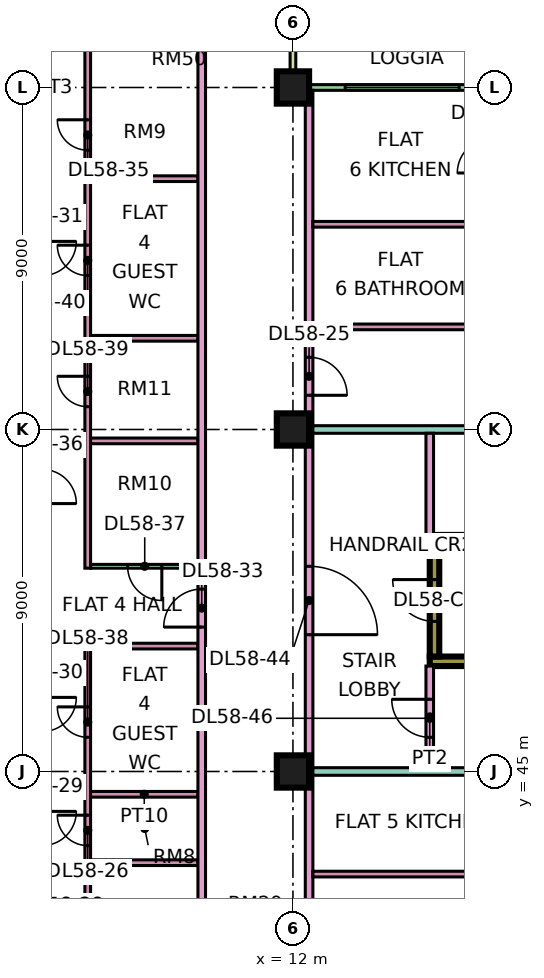
"""IFC4 building model, lengths in metres.
Left out: names, types, materials, properties, quantities, classifications, styles, units other than length and angle.
Written with IfcOpenShell. Run it as: python <this file> out.ifc"""

import sys

from ifc_helpers import new_model, si_unit, direction, frame, frame_2d, origin, origin_2d, place, context, subcontext, project, spatial, rectangle, extrude, element, fill, save


model = new_model("IFC4")
c1 = context("Model", 3, precision=1e-05, world=origin(), true_north=direction((0.0, 1.0)))
c2 = subcontext(c1, "Body", "Model", "MODEL_VIEW")
j1 = project(units=[si_unit("LENGTHUNIT", "METRE"), si_unit("PLANEANGLEUNIT", "RADIAN")], contexts=[c1])
p1 = place(None, origin())
s1 = spatial("IfcSite", under=j1, at=p1, CompositionType="ELEMENT")
p2 = place(p1, origin())
s2 = spatial("IfcBuilding", under=s1, at=p2, CompositionType="ELEMENT")
p3 = place(p2, frame((0.0, 0.0, 245.4)))
s3 = spatial("IfcBuildingStorey", under=s2, at=p3, CompositionType="ELEMENT", Elevation=245.4)
for number, where, z_axis, x_axis in (
    (1, (12.0, 45.0, 0.0), (0.0, 0.0, 1.0), (1.0, 0.0, 0.0)),
    (2, (12.0, 54.0, 0.0), (0.0, 0.0, 1.0), (1.0, 0.0, 0.0)),
    (3, (12.0, 63.0, 0.0), (0.0, 0.0, 1.0), (1.0, 0.0, 0.0)),
):
    element("IfcColumn", number, at=place(p3, frame(where, z_axis=z_axis, x_axis=x_axis)), inside=s3, PredefinedType="COLUMN", context=c2, shape_type="SweptSolid", body=[
        extrude(rectangle(XDim=0.85, YDim=0.85, at=origin_2d()), origin(), (0.0, 0.0, 1.0), 3.75),
    ])
for number, where, z_axis, x_axis in (
    (4, (15.6, 47.9, 0.0), (0.0, 0.0, 1.0), (1.0, 0.0, 0.0)),
    (5, (15.6, 51.1, 0.0), (0.0, 0.0, 1.0), (1.0, 0.0, 0.0)),
):
    element("IfcWall", number, at=place(p3, frame(where, z_axis=z_axis, x_axis=x_axis)), inside=s3, PredefinedType="SHEAR", context=c2, shape_type="SweptSolid", body=[
        extrude(rectangle(XDim=7.0, YDim=0.25, at=frame_2d((3.5, 0.0))), origin(), (0.0, 0.0, 1.0), 3.75),
    ])
p4 = place(p3, frame((15.725, 48.025, 0.0), z_axis=(0.0, 0.0, 1.0), x_axis=(0.0, 1.0, 0.0)))
e6 = element("IfcWall", 6, at=p4, inside=s3, PredefinedType="SHEAR", context=c2, shape_type="SweptSolid", body=[
    extrude(rectangle(XDim=2.95, YDim=0.25, at=frame_2d((1.475, 0.0))), origin(), (0.0, 0.0, 1.0), 3.75),
])
p5 = place(p4, frame((0.925, 0.0, 0.0)))
e7 = element("IfcOpeningElement", 7, at=p5, cuts=e6, PredefinedType="OPENING", context=c2, shape_type="SweptSolid", body=[
    extrude(rectangle(XDim=1.1, YDim=2.2, at=frame_2d((0.55, 1.1))), frame((0.0, 0.135, 0.0), z_axis=(0.0, -1.0, 0.0), x_axis=(1.0, 0.0, 0.0)), (0.0, 0.0, 1.0), 0.27),
])
p6 = place(p3, frame((22.425, 63.0, 0.0), z_axis=(0.0, 0.0, 1.0), x_axis=(-1.0, 0.0, 0.0)))
e8 = element("IfcWall", 8, at=p6, inside=s3, PredefinedType="SOLIDWALL", context=c2, shape_type="SweptSolid", body=[
    extrude(rectangle(XDim=10.35, YDim=0.15, at=frame_2d((5.175, 0.0))), origin(), (0.0, 0.0, 1.0), 3.35),
])
p7 = place(p6, frame((1.7, 0.0, 0.0)))
e9 = element("IfcOpeningElement", 9, at=p7, cuts=e8, PredefinedType="OPENING", context=c2, shape_type="SweptSolid", body=[
    extrude(rectangle(XDim=1.8, YDim=2.4, at=frame_2d((0.9, 1.2))), frame((0.0, 0.085, 0.0), z_axis=(0.0, -1.0, 0.0), x_axis=(1.0, 0.0, 0.0)), (0.0, 0.0, 1.0), 0.17),
])
p8 = place(p6, frame((6.05, 0.0, 0.45)))
e10 = element("IfcOpeningElement", 10, at=p8, cuts=e8, PredefinedType="OPENING", context=c2, shape_type="SweptSolid", body=[
    extrude(rectangle(XDim=3.0, YDim=2.4, at=frame_2d((1.5, 1.2))), frame((0.0, 0.085, 0.0), z_axis=(0.0, -1.0, 0.0), x_axis=(1.0, 0.0, 0.0)), (0.0, 0.0, 1.0), 0.17),
])
p9 = place(p3, frame((12.0, 64.5, 0.0), z_axis=(0.0, 0.0, 1.0), x_axis=(0.0, -1.0, 0.0)))
e11 = element("IfcWall", 11, at=p9, inside=s3, PredefinedType="SOLIDWALL", context=c2, shape_type="SweptSolid", body=[
    extrude(rectangle(XDim=1.5, YDim=0.15, at=frame_2d((0.75, 0.0))), origin(), (0.0, 0.0, 1.0), 3.35),
])
p10 = place(p3, frame((5.45, 63.0, 0.0), z_axis=(0.0, 0.0, 1.0), x_axis=(1.0, 0.0, 0.0)))
e12 = element("IfcWall", 12, at=p10, inside=s3, PredefinedType="PARTITIONING", context=c2, shape_type="SweptSolid", body=[
    extrude(rectangle(XDim=0.55, YDim=0.1, at=frame_2d((0.275, 0.0))), origin(), (0.0, 0.0, 1.0), 3.35),
])
p11 = place(p3, frame((6.6, 36.1, 0.0), z_axis=(0.0, 0.0, 1.0), x_axis=(0.0, 1.0, 0.0)))
e13 = element("IfcWall", 13, at=p11, inside=s3, PredefinedType="PARTITIONING", context=c2, shape_type="SweptSolid", body=[
    extrude(rectangle(XDim=12.275, YDim=0.15, at=frame_2d((6.137, 0.0))), origin(), (0.0, 0.0, 1.0), 3.35),
])
p12 = place(p11, frame((6.95, 0.0, 0.0)))
e14 = element("IfcOpeningElement", 14, at=p12, cuts=e13, PredefinedType="OPENING", context=c2, shape_type="SweptSolid", body=[
    extrude(rectangle(XDim=0.8, YDim=2.1, at=frame_2d((0.4, 1.05))), frame((0.0, 0.085, 0.0), z_axis=(0.0, -1.0, 0.0), x_axis=(1.0, 0.0, 0.0)), (0.0, 0.0, 1.0), 0.17),
])
p13 = place(p11, frame((2.75, 0.0, 0.0)))
e15 = element("IfcOpeningElement", 15, at=p13, cuts=e13, PredefinedType="OPENING", context=c2, shape_type="SweptSolid", body=[
    extrude(rectangle(XDim=0.9, YDim=2.1, at=frame_2d((0.45, 1.05))), frame((0.0, 0.085, 0.0), z_axis=(0.0, -1.0, 0.0), x_axis=(1.0, 0.0, 0.0)), (0.0, 0.0, 1.0), 0.17),
])
p14 = place(p11, frame((9.8, 0.0, 0.0)))
e16 = element("IfcOpeningElement", 16, at=p14, cuts=e13, PredefinedType="OPENING", context=c2, shape_type="SweptSolid", body=[
    extrude(rectangle(XDim=0.8, YDim=2.1, at=frame_2d((0.4, 1.05))), frame((0.0, 0.085, 0.0), z_axis=(0.0, -1.0, 0.0), x_axis=(1.0, 0.0, 0.0)), (0.0, 0.0, 1.0), 0.17),
])
p15 = place(p3, frame((6.6, 50.35, 0.0), z_axis=(0.0, 0.0, 1.0), x_axis=(0.0, 1.0, 0.0)))
e17 = element("IfcWall", 17, at=p15, inside=s3, PredefinedType="PARTITIONING", context=c2, shape_type="SweptSolid", body=[
    extrude(rectangle(XDim=14.0, YDim=0.15, at=frame_2d((7.0, 0.0))), origin(), (0.0, 0.0, 1.0), 3.35),
])
p16 = place(p15, frame((11.0, 0.0, 0.0)))
e18 = element("IfcOpeningElement", 18, at=p16, cuts=e17, PredefinedType="OPENING", context=c2, shape_type="SweptSolid", body=[
    extrude(rectangle(XDim=0.8, YDim=2.1, at=frame_2d((0.4, 1.05))), frame((0.0, 0.085, 0.0), z_axis=(0.0, -1.0, 0.0), x_axis=(1.0, 0.0, 0.0)), (0.0, 0.0, 1.0), 0.17),
])
p17 = place(p15, frame((4.25, 0.0, 0.0)))
e19 = element("IfcOpeningElement", 19, at=p17, cuts=e17, PredefinedType="OPENING", context=c2, shape_type="SweptSolid", body=[
    extrude(rectangle(XDim=0.8, YDim=2.1, at=frame_2d((0.4, 1.05))), frame((0.0, 0.085, 0.0), z_axis=(0.0, -1.0, 0.0), x_axis=(1.0, 0.0, 0.0)), (0.0, 0.0, 1.0), 0.17),
])
p18 = place(p15, frame((7.7, 0.0, 0.0)))
e20 = element("IfcOpeningElement", 20, at=p18, cuts=e17, PredefinedType="OPENING", context=c2, shape_type="SweptSolid", body=[
    extrude(rectangle(XDim=0.8, YDim=2.1, at=frame_2d((0.4, 1.05))), frame((0.0, 0.085, 0.0), z_axis=(0.0, -1.0, 0.0), x_axis=(1.0, 0.0, 0.0)), (0.0, 0.0, 1.0), 0.17),
])
for number, where, z_axis, x_axis in (
    (21, (6.675, 42.6, 0.0), (0.0, 0.0, 1.0), (1.0, 0.0, 0.0)),
    (22, (6.675, 44.4, 0.0), (0.0, 0.0, 1.0), (1.0, 0.0, 0.0)),
    (23, (6.675, 48.3, 0.0), (0.0, 0.0, 1.0), (1.0, 0.0, 0.0)),
):
    element("IfcWall", number, at=place(p3, frame(where, z_axis=z_axis, x_axis=x_axis)), inside=s3, PredefinedType="PARTITIONING", context=c2, shape_type="SweptSolid", body=[
        extrude(rectangle(XDim=2.825, YDim=0.15, at=frame_2d((1.413, 0.0))), origin(), (0.0, 0.0, 1.0), 3.35),
    ])
p19 = place(p3, frame((6.675, 50.4, 0.0), z_axis=(0.0, 0.0, 1.0), x_axis=(1.0, 0.0, 0.0)))
e24 = element("IfcWall", 24, at=p19, inside=s3, PredefinedType="PARTITIONING", context=c2, shape_type="SweptSolid", body=[
    extrude(rectangle(XDim=2.825, YDim=0.1, at=frame_2d((1.413, 0.0))), origin(), (0.0, 0.0, 1.0), 3.35),
])
p20 = place(p19, frame((0.975, 0.0, 0.0)))
e25 = element("IfcOpeningElement", 25, at=p20, cuts=e24, PredefinedType="OPENING", context=c2, shape_type="SweptSolid", body=[
    extrude(rectangle(XDim=0.9, YDim=2.1, at=frame_2d((0.45, 1.05))), frame((0.0, 0.06, 0.0), z_axis=(0.0, -1.0, 0.0), x_axis=(1.0, 0.0, 0.0)), (0.0, 0.0, 1.0), 0.12),
])
for number, where, z_axis, x_axis in (
    (26, (6.675, 53.7, 0.0), (0.0, 0.0, 1.0), (1.0, 0.0, 0.0)),
    (27, (6.675, 56.4, 0.0), (0.0, 0.0, 1.0), (1.0, 0.0, 0.0)),
    (28, (6.675, 60.6, 0.0), (0.0, 0.0, 1.0), (1.0, 0.0, 0.0)),
):
    element("IfcWall", number, at=place(p3, frame(where, z_axis=z_axis, x_axis=x_axis)), inside=s3, PredefinedType="PARTITIONING", context=c2, shape_type="SweptSolid", body=[
        extrude(rectangle(XDim=2.825, YDim=0.15, at=frame_2d((1.413, 0.0))), origin(), (0.0, 0.0, 1.0), 3.35),
    ])
p21 = place(p3, frame((9.6, 20.0, 0.0), z_axis=(0.0, 0.0, 1.0), x_axis=(0.0, 1.0, 0.0)))
e29 = element("IfcWall", 29, at=p21, inside=s3, PredefinedType="PARTITIONING", context=c2, shape_type="SweptSolid", body=[
    extrude(rectangle(XDim=44.35, YDim=0.2, at=frame_2d((22.175, 0.0))), origin(), (0.0, 0.0, 1.0), 3.35),
])
p22 = place(p21, frame((28.8, 0.0, 0.0)))
e30 = element("IfcOpeningElement", 30, at=p22, cuts=e29, PredefinedType="OPENING", context=c2, shape_type="SweptSolid", body=[
    extrude(rectangle(XDim=1.0, YDim=2.1, at=frame_2d((0.5, 1.05))), frame((0.0, 0.11, 0.0), z_axis=(0.0, -1.0, 0.0), x_axis=(1.0, 0.0, 0.0)), (0.0, 0.0, 1.0), 0.22),
])
p23 = place(p21, frame((0.6, 0.0, 0.0)))
e31 = element("IfcOpeningElement", 31, at=p23, cuts=e29, PredefinedType="OPENING", context=c2, shape_type="SweptSolid", body=[
    extrude(rectangle(XDim=1.2, YDim=2.1, at=frame_2d((0.6, 1.05))), frame((0.0, 0.11, 0.0), z_axis=(0.0, -1.0, 0.0), x_axis=(1.0, 0.0, 0.0)), (0.0, 0.0, 1.0), 0.22),
])
p24 = place(p21, frame((3.9, 0.0, 0.0)))
e32 = element("IfcOpeningElement", 32, at=p24, cuts=e29, PredefinedType="OPENING", context=c2, shape_type="SweptSolid", body=[
    extrude(rectangle(XDim=1.0, YDim=2.1, at=frame_2d((0.5, 1.05))), frame((0.0, 0.11, 0.0), z_axis=(0.0, -1.0, 0.0), x_axis=(1.0, 0.0, 0.0)), (0.0, 0.0, 1.0), 0.22),
])
p25 = place(p3, frame((12.425, 20.0, 0.0), z_axis=(0.0, 0.0, 1.0), x_axis=(0.0, 1.0, 0.0)))
e33 = element("IfcWall", 33, at=p25, inside=s3, PredefinedType="PARTITIONING", context=c2, shape_type="SweptSolid", body=[
    extrude(rectangle(XDim=42.926, YDim=0.2, at=frame_2d((21.463, 0.0))), origin(), (0.0, 0.0, 1.0), 3.35),
])
p26 = place(p25, frame((7.0, 0.0, 0.0)))
e34 = element("IfcOpeningElement", 34, at=p26, cuts=e33, PredefinedType="OPENING", context=c2, shape_type="SweptSolid", body=[
    extrude(rectangle(XDim=1.0, YDim=2.1, at=frame_2d((0.5, 1.05))), frame((0.0, 0.11, 0.0), z_axis=(0.0, -1.0, 0.0), x_axis=(1.0, 0.0, 0.0)), (0.0, 0.0, 1.0), 0.22),
])
p27 = place(p25, frame((12.95, 0.0, 0.0)))
e35 = element("IfcOpeningElement", 35, at=p27, cuts=e33, PredefinedType="OPENING", context=c2, shape_type="SweptSolid", body=[
    extrude(rectangle(XDim=1.0, YDim=2.1, at=frame_2d((0.5, 1.05))), frame((0.0, 0.11, 0.0), z_axis=(0.0, -1.0, 0.0), x_axis=(1.0, 0.0, 0.0)), (0.0, 0.0, 1.0), 0.22),
])
p28 = place(p25, frame((16.75, 0.0, 0.0)))
e36 = element("IfcOpeningElement", 36, at=p28, cuts=e33, PredefinedType="OPENING", context=c2, shape_type="SweptSolid", body=[
    extrude(rectangle(XDim=1.0, YDim=2.1, at=frame_2d((0.5, 1.05))), frame((0.0, 0.11, 0.0), z_axis=(0.0, -1.0, 0.0), x_axis=(1.0, 0.0, 0.0)), (0.0, 0.0, 1.0), 0.22),
])
p29 = place(p25, frame((34.9, 0.0, 0.0)))
e37 = element("IfcOpeningElement", 37, at=p29, cuts=e33, PredefinedType="OPENING", context=c2, shape_type="SweptSolid", body=[
    extrude(rectangle(XDim=1.0, YDim=2.1, at=frame_2d((0.5, 1.05))), frame((0.0, 0.11, 0.0), z_axis=(0.0, -1.0, 0.0), x_axis=(1.0, 0.0, 0.0)), (0.0, 0.0, 1.0), 0.22),
])
p30 = place(p25, frame((1.15, 0.0, 0.0)))
e38 = element("IfcOpeningElement", 38, at=p30, cuts=e33, PredefinedType="OPENING", context=c2, shape_type="SweptSolid", body=[
    extrude(rectangle(XDim=1.8, YDim=2.1, at=frame_2d((0.9, 1.05))), frame((0.0, 0.11, 0.0), z_axis=(0.0, -1.0, 0.0), x_axis=(1.0, 0.0, 0.0)), (0.0, 0.0, 1.0), 0.22),
])
p31 = place(p25, frame((28.6, 0.0, 0.0)))
e39 = element("IfcOpeningElement", 39, at=p31, cuts=e33, PredefinedType="OPENING", context=c2, shape_type="SweptSolid", body=[
    extrude(rectangle(XDim=1.8, YDim=2.1, at=frame_2d((0.9, 1.05))), frame((0.0, 0.11, 0.0), z_axis=(0.0, -1.0, 0.0), x_axis=(1.0, 0.0, 0.0)), (0.0, 0.0, 1.0), 0.22),
])
p32 = place(p3, frame((12.525, 42.3, 0.0), z_axis=(0.0, 0.0, 1.0), x_axis=(1.0, 0.0, 0.0)))
e40 = element("IfcWall", 40, at=p32, inside=s3, PredefinedType="PARTITIONING", context=c2, shape_type="SweptSolid", body=[
    extrude(rectangle(XDim=5.225, YDim=0.15, at=frame_2d((2.613, 0.0))), origin(), (0.0, 0.0, 1.0), 3.35),
])
p33 = place(p3, frame((12.525, 45.0, 0.0), z_axis=(0.0, 0.0, 1.0), x_axis=(1.0, 0.0, 0.0)))
e41 = element("IfcWall", 41, at=p33, inside=s3, PredefinedType="PARTITIONING", context=c2, shape_type="SweptSolid", body=[
    extrude(rectangle(XDim=11.401, YDim=0.2, at=frame_2d((5.701, 0.0))), origin(), (0.0, 0.0, 1.0), 3.35),
])
p34 = place(p3, frame((12.525, 54.0, 0.0), z_axis=(0.0, 0.0, 1.0), x_axis=(1.0, 0.0, 0.0)))
e42 = element("IfcWall", 42, at=p34, inside=s3, PredefinedType="PARTITIONING", context=c2, shape_type="SweptSolid", body=[
    extrude(rectangle(XDim=11.475, YDim=0.2, at=frame_2d((5.738, 0.0))), origin(), (0.0, 0.0, 1.0), 3.35),
])
for number, where, z_axis, x_axis in (
    (43, (12.525, 56.7, 0.0), (0.0, 0.0, 1.0), (1.0, 0.0, 0.0)),
    (44, (12.525, 59.4, 0.0), (0.0, 0.0, 1.0), (1.0, 0.0, 0.0)),
):
    element("IfcWall", number, at=place(p3, frame(where, z_axis=z_axis, x_axis=x_axis)), inside=s3, PredefinedType="PARTITIONING", context=c2, shape_type="SweptSolid", body=[
        extrude(rectangle(XDim=4.625, YDim=0.15, at=frame_2d((2.312, 0.0))), origin(), (0.0, 0.0, 1.0), 3.35),
    ])
p35 = place(p3, frame((15.6, 45.1, 0.0), z_axis=(0.0, 0.0, 1.0), x_axis=(0.0, 1.0, 0.0)))
e45 = element("IfcWall", 45, at=p35, inside=s3, PredefinedType="PARTITIONING", context=c2, shape_type="SweptSolid", body=[
    extrude(rectangle(XDim=2.675, YDim=0.2, at=frame_2d((1.337, 0.0))), origin(), (0.0, 0.0, 1.0), 3.35),
])
p36 = place(p35, frame((0.8, 0.0, 0.0)))
e46 = element("IfcOpeningElement", 46, at=p36, cuts=e45, PredefinedType="OPENING", context=c2, shape_type="SweptSolid", body=[
    extrude(rectangle(XDim=1.0, YDim=2.1, at=frame_2d((0.5, 1.05))), frame((0.0, 0.11, 0.0), z_axis=(0.0, -1.0, 0.0), x_axis=(1.0, 0.0, 0.0)), (0.0, 0.0, 1.0), 0.22),
])
p37 = place(p3, frame((15.6, 51.225, 0.0), z_axis=(0.0, 0.0, 1.0), x_axis=(0.0, 1.0, 0.0)))
e47 = element("IfcWall", 47, at=p37, inside=s3, PredefinedType="PARTITIONING", context=c2, shape_type="SweptSolid", body=[
    extrude(rectangle(XDim=2.675, YDim=0.2, at=frame_2d((1.337, 0.0))), origin(), (0.0, 0.0, 1.0), 3.35),
])
p38 = place(p8, origin())
e48 = element("IfcWindow", 48, at=p38, inside=s3, PartitioningType="SINGLE_PANEL", PredefinedType="WINDOW", context=c2, shape_type="SweptSolid", body=[
    extrude(rectangle(XDim=3.0, YDim=2.4, at=frame_2d((1.5, 1.2))), frame((0.0, 0.03, 0.0), z_axis=(0.0, -1.0, 0.0), x_axis=(1.0, 0.0, 0.0)), (0.0, 0.0, 1.0), 0.06),
])
fill(e10, e48)
p39 = place(p5, frame((1.1, 0.0, 0.0), z_axis=(0.0, 0.0, 1.0), x_axis=(-1.0, 0.0, 0.0)))
e49 = element("IfcDoor", 49, at=p39, inside=s3, OperationType="SINGLE_SWING_RIGHT", PredefinedType="DOOR", context=c2, shape_type="SweptSolid", body=[
    extrude(rectangle(XDim=1.1, YDim=2.2, at=frame_2d((0.55, 1.1))), frame((0.0, 0.025, 0.0), z_axis=(0.0, -1.0, 0.0), x_axis=(1.0, 0.0, 0.0)), (0.0, 0.0, 1.0), 0.05),
])
fill(e7, e49)
p40 = place(p29, frame((1.0, 0.0, 0.0), z_axis=(0.0, 0.0, 1.0), x_axis=(-1.0, 0.0, 0.0)))
e50 = element("IfcDoor", 50, at=p40, inside=s3, OperationType="SINGLE_SWING_LEFT", PredefinedType="DOOR", context=c2, shape_type="SweptSolid", body=[
    extrude(rectangle(XDim=1.0, YDim=2.1, at=frame_2d((0.5, 1.05))), frame((0.0, 0.025, 0.0), z_axis=(0.0, -1.0, 0.0), x_axis=(1.0, 0.0, 0.0)), (0.0, 0.0, 1.0), 0.05),
])
fill(e37, e50)
p41 = place(p12, frame((0.8, 0.0, 0.0), z_axis=(0.0, 0.0, 1.0), x_axis=(-1.0, 0.0, 0.0)))
e51 = element("IfcDoor", 51, at=p41, inside=s3, OperationType="SINGLE_SWING_RIGHT", PredefinedType="DOOR", context=c2, shape_type="SweptSolid", body=[
    extrude(rectangle(XDim=0.8, YDim=2.1, at=frame_2d((0.4, 1.05))), frame((0.0, 0.025, 0.0), z_axis=(0.0, -1.0, 0.0), x_axis=(1.0, 0.0, 0.0)), (0.0, 0.0, 1.0), 0.05),
])
fill(e14, e51)
p42 = place(p22, origin())
e52 = element("IfcDoor", 52, at=p42, inside=s3, OperationType="SINGLE_SWING_LEFT", PredefinedType="DOOR", context=c2, shape_type="SweptSolid", body=[
    extrude(rectangle(XDim=1.0, YDim=2.1, at=frame_2d((0.5, 1.05))), frame((0.0, 0.025, 0.0), z_axis=(0.0, -1.0, 0.0), x_axis=(1.0, 0.0, 0.0)), (0.0, 0.0, 1.0), 0.05),
])
fill(e30, e52)
p43 = place(p16, frame((0.8, 0.0, 0.0), z_axis=(0.0, 0.0, 1.0), x_axis=(-1.0, 0.0, 0.0)))
e53 = element("IfcDoor", 53, at=p43, inside=s3, OperationType="SINGLE_SWING_RIGHT", PredefinedType="DOOR", context=c2, shape_type="SweptSolid", body=[
    extrude(rectangle(XDim=0.8, YDim=2.1, at=frame_2d((0.4, 1.05))), frame((0.0, 0.025, 0.0), z_axis=(0.0, -1.0, 0.0), x_axis=(1.0, 0.0, 0.0)), (0.0, 0.0, 1.0), 0.05),
])
fill(e18, e53)
p44 = place(p20, origin())
e54 = element("IfcDoor", 54, at=p44, inside=s3, OperationType="SINGLE_SWING_RIGHT", PredefinedType="DOOR", context=c2, shape_type="SweptSolid", body=[
    extrude(rectangle(XDim=0.9, YDim=2.1, at=frame_2d((0.45, 1.05))), frame((0.0, 0.025, 0.0), z_axis=(0.0, -1.0, 0.0), x_axis=(1.0, 0.0, 0.0)), (0.0, 0.0, 1.0), 0.05),
])
fill(e25, e54)
p45 = place(p14, frame((0.8, 0.0, 0.0), z_axis=(0.0, 0.0, 1.0), x_axis=(-1.0, 0.0, 0.0)))
e55 = element("IfcDoor", 55, at=p45, inside=s3, OperationType="SINGLE_SWING_RIGHT", PredefinedType="DOOR", context=c2, shape_type="SweptSolid", body=[
    extrude(rectangle(XDim=0.8, YDim=2.1, at=frame_2d((0.4, 1.05))), frame((0.0, 0.025, 0.0), z_axis=(0.0, -1.0, 0.0), x_axis=(1.0, 0.0, 0.0)), (0.0, 0.0, 1.0), 0.05),
])
fill(e16, e55)
p46 = place(p17, frame((0.8, 0.0, 0.0), z_axis=(0.0, 0.0, 1.0), x_axis=(-1.0, 0.0, 0.0)))
e56 = element("IfcDoor", 56, at=p46, inside=s3, OperationType="SINGLE_SWING_RIGHT", PredefinedType="DOOR", context=c2, shape_type="SweptSolid", body=[
    extrude(rectangle(XDim=0.8, YDim=2.1, at=frame_2d((0.4, 1.05))), frame((0.0, 0.025, 0.0), z_axis=(0.0, -1.0, 0.0), x_axis=(1.0, 0.0, 0.0)), (0.0, 0.0, 1.0), 0.05),
])
fill(e19, e56)
p47 = place(p18, frame((0.8, 0.0, 0.0), z_axis=(0.0, 0.0, 1.0), x_axis=(-1.0, 0.0, 0.0)))
e57 = element("IfcDoor", 57, at=p47, inside=s3, OperationType="SINGLE_SWING_RIGHT", PredefinedType="DOOR", context=c2, shape_type="SweptSolid", body=[
    extrude(rectangle(XDim=0.8, YDim=2.1, at=frame_2d((0.4, 1.05))), frame((0.0, 0.025, 0.0), z_axis=(0.0, -1.0, 0.0), x_axis=(1.0, 0.0, 0.0)), (0.0, 0.0, 1.0), 0.05),
])
fill(e20, e57)
p48 = place(p31, frame((1.8, 0.0, 0.0), z_axis=(0.0, 0.0, 1.0), x_axis=(-1.0, 0.0, 0.0)))
e58 = element("IfcDoor", 58, at=p48, inside=s3, OperationType="DOUBLE_DOOR_SINGLE_SWING", PredefinedType="DOOR", context=c2, shape_type="SweptSolid", body=[
    extrude(rectangle(XDim=1.8, YDim=2.1, at=frame_2d((0.9, 1.05))), frame((0.0, 0.025, 0.0), z_axis=(0.0, -1.0, 0.0), x_axis=(1.0, 0.0, 0.0)), (0.0, 0.0, 1.0), 0.05),
])
fill(e39, e58)
p49 = place(p36, frame((1.0, 0.0, 0.0), z_axis=(0.0, 0.0, 1.0), x_axis=(-1.0, 0.0, 0.0)))
e59 = element("IfcDoor", 59, at=p49, inside=s3, OperationType="SINGLE_SWING_RIGHT", PredefinedType="DOOR", context=c2, shape_type="SweptSolid", body=[
    extrude(rectangle(XDim=1.0, YDim=2.1, at=frame_2d((0.5, 1.05))), frame((0.0, 0.025, 0.0), z_axis=(0.0, -1.0, 0.0), x_axis=(1.0, 0.0, 0.0)), (0.0, 0.0, 1.0), 0.05),
])
fill(e46, e59)
save(model, sys.argv[1])
